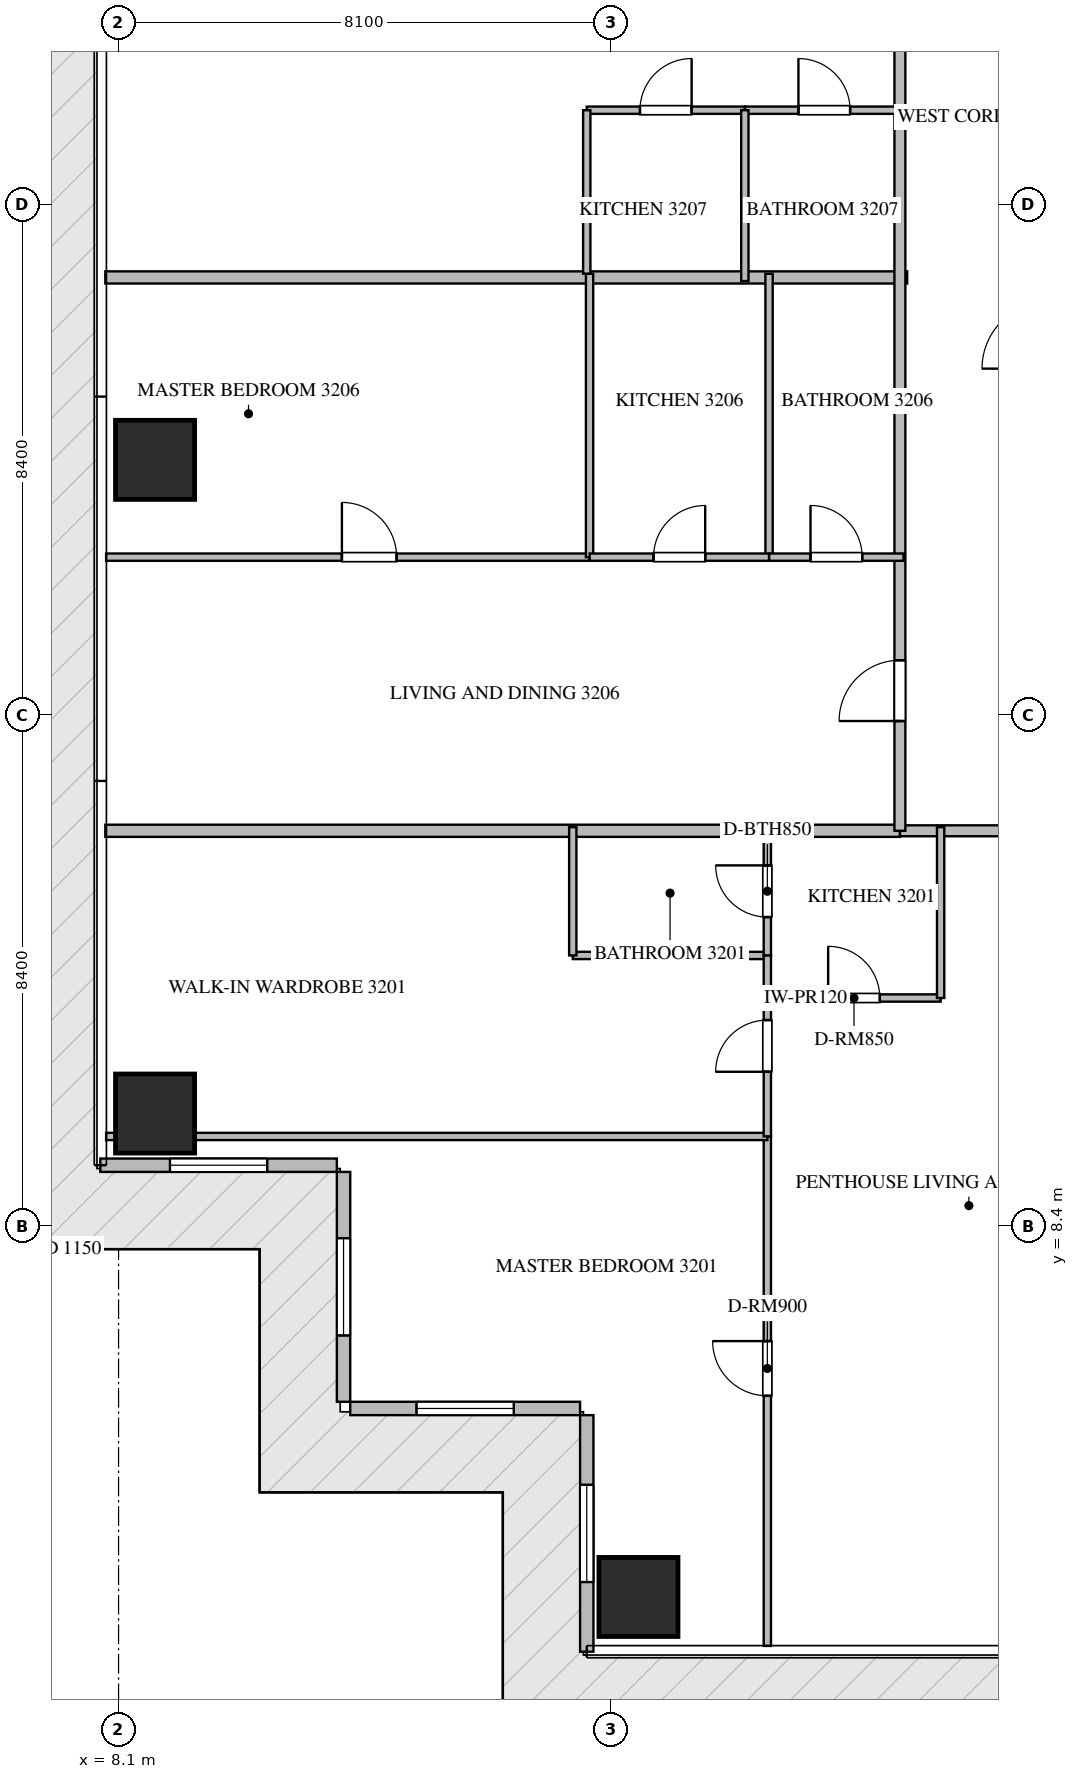
"""IFC4 building model, lengths in metres.
Left out: names, types, materials, properties, quantities, classifications, styles, units other than length and angle.
Written with IfcOpenShell. Run it as: python <this file> out.ifc"""

import sys

from ifc_helpers import new_model, si_unit, direction, frame, frame_2d, origin, origin_2d, place, context, subcontext, project, spatial, rectangle, extrude, source, transform, mapped, element, fill, save


model = new_model("IFC4")
c1 = context("Model", 3, precision=1e-05, world=origin(), true_north=direction((0.0, 1.0)))
c2 = subcontext(c1, "Body", "Model", "MODEL_VIEW")
j1 = project(units=[si_unit("LENGTHUNIT", "METRE"), si_unit("PLANEANGLEUNIT", "RADIAN")], contexts=[c1])
p1 = place(None, origin())
s1 = spatial("IfcSite", under=j1, at=p1, CompositionType="ELEMENT")
p2 = place(p1, origin())
s2 = spatial("IfcBuilding", under=s1, at=p2, CompositionType="ELEMENT")
p3 = place(p2, frame((0.0, 0.0, 131.4)))
s3 = spatial("IfcBuildingStorey", under=s2, at=p3, CompositionType="ELEMENT", Elevation=131.4)
m1 = source(origin(), c2, "Body", "SweptSolid", [
    extrude(rectangle(XDim=1.3, YDim=1.3, at=origin_2d()), origin(), (0.0, 0.0, 1.0), 3.75),
])
for number, where, z_axis, x_axis in (
    (1, (16.65, 2.3, -0.26), (0.0, 0.0, 1.0), (1.0, 0.0, 0.0)),
    (2, (8.7, 10.25, -0.26), (0.0, 0.0, 1.0), (1.0, 0.0, 0.0)),
    (3, (8.7, 21.0, -0.26), (0.0, 0.0, 1.0), (1.0, 0.0, 0.0)),
):
    element("IfcColumn", number, at=place(p3, frame(where, z_axis=z_axis, x_axis=x_axis)), inside=s3, PredefinedType="COLUMN", context=c2, shape_type="MappedRepresentation", body=[
        mapped(m1, transform((0.0, 0.0, 0.0), scale=1.0)),
    ])
p4 = place(p3, frame((7.8, 9.4, 0.0), z_axis=(0.0, 0.0, 1.0), x_axis=(1.0, 0.0, 0.0)))
e4 = element("IfcWall", 4, at=p4, inside=s3, PredefinedType="ELEMENTEDWALL", context=c2, shape_type="SweptSolid", body=[
    extrude(rectangle(XDim=3.89, YDim=0.22, at=frame_2d((1.945, 0.0))), origin(), (0.0, 0.0, 1.0), 3.475),
])
p5 = place(p4, frame((1.145, 0.0, 0.65)))
e5 = element("IfcOpeningElement", 5, at=p5, cuts=e4, PredefinedType="OPENING", context=c2, shape_type="SweptSolid", body=[
    extrude(rectangle(XDim=1.6, YDim=2.1, at=frame_2d((0.8, 1.05))), frame((0.0, 0.12, 0.0), z_axis=(0.0, -1.0, 0.0), x_axis=(1.0, 0.0, 0.0)), (0.0, 0.0, 1.0), 0.24),
])
p6 = place(p3, frame((11.8, 9.29, 0.0), z_axis=(0.0, 0.0, 1.0), x_axis=(0.0, -1.0, 0.0)))
e6 = element("IfcWall", 6, at=p6, inside=s3, PredefinedType="ELEMENTEDWALL", context=c2, shape_type="SweptSolid", body=[
    extrude(rectangle(XDim=3.78, YDim=0.22, at=frame_2d((1.89, 0.0))), origin(), (0.0, 0.0, 1.0), 3.475),
])
p7 = place(p6, frame((1.09, 0.0, 0.65)))
e7 = element("IfcOpeningElement", 7, at=p7, cuts=e6, PredefinedType="OPENING", context=c2, shape_type="SweptSolid", body=[
    extrude(rectangle(XDim=1.6, YDim=2.1, at=frame_2d((0.8, 1.05))), frame((0.0, 0.12, 0.0), z_axis=(0.0, -1.0, 0.0), x_axis=(1.0, 0.0, 0.0)), (0.0, 0.0, 1.0), 0.24),
])
p8 = place(p3, frame((11.91, 5.4, 0.0), z_axis=(0.0, 0.0, 1.0), x_axis=(1.0, 0.0, 0.0)))
e8 = element("IfcWall", 8, at=p8, inside=s3, PredefinedType="ELEMENTEDWALL", context=c2, shape_type="SweptSolid", body=[
    extrude(rectangle(XDim=3.78, YDim=0.22, at=frame_2d((1.89, 0.0))), origin(), (0.0, 0.0, 1.0), 3.475),
])
p9 = place(p8, frame((1.09, 0.0, 0.65)))
e9 = element("IfcOpeningElement", 9, at=p9, cuts=e8, PredefinedType="OPENING", context=c2, shape_type="SweptSolid", body=[
    extrude(rectangle(XDim=1.6, YDim=2.1, at=frame_2d((0.8, 1.05))), frame((0.0, 0.12, 0.0), z_axis=(0.0, -1.0, 0.0), x_axis=(1.0, 0.0, 0.0)), (0.0, 0.0, 1.0), 0.24),
])
p10 = place(p3, frame((15.8, 5.29, 0.0), z_axis=(0.0, 0.0, 1.0), x_axis=(0.0, -1.0, 0.0)))
e10 = element("IfcWall", 10, at=p10, inside=s3, PredefinedType="ELEMENTEDWALL", context=c2, shape_type="SweptSolid", body=[
    extrude(rectangle(XDim=3.89, YDim=0.22, at=frame_2d((1.945, 0.0))), origin(), (0.0, 0.0, 1.0), 3.475),
])
p11 = place(p10, frame((1.145, 0.0, 0.65)))
e11 = element("IfcOpeningElement", 11, at=p11, cuts=e10, PredefinedType="OPENING", context=c2, shape_type="SweptSolid", body=[
    extrude(rectangle(XDim=1.6, YDim=2.1, at=frame_2d((0.8, 1.05))), frame((0.0, 0.12, 0.0), z_axis=(0.0, -1.0, 0.0), x_axis=(1.0, 0.0, 0.0)), (0.0, 0.0, 1.0), 0.24),
])
p12 = place(p3, frame((7.882, 24.0, 0.0), z_axis=(0.0, 0.0, 1.0), x_axis=(1.0, 0.0, 0.0)))
e12 = element("IfcWall", 12, at=p12, inside=s3, PredefinedType="PARTITIONING", context=c2, shape_type="SweptSolid", body=[
    extrude(rectangle(XDim=13.188, YDim=0.2, at=frame_2d((6.594, 0.0))), origin(), (0.0, 0.0, 1.0), 3.49),
])
p13 = place(p3, frame((7.882, 14.9, 0.0), z_axis=(0.0, 0.0, 1.0), x_axis=(1.0, 0.0, 0.0)))
e13 = element("IfcWall", 13, at=p13, inside=s3, PredefinedType="PARTITIONING", context=c2, shape_type="SweptSolid", body=[
    extrude(rectangle(XDim=13.068, YDim=0.2, at=frame_2d((6.534, 0.0))), origin(), (0.0, 0.0, 1.0), 3.49),
])
p14 = place(p3, frame((20.952, 14.9, 0.0), z_axis=(0.0, 0.0, 1.0), x_axis=(1.0, 0.0, 0.0)))
e14 = element("IfcWall", 14, at=p14, inside=s3, PredefinedType="PARTITIONING", context=c2, shape_type="SweptSolid", body=[
    extrude(rectangle(XDim=22.896, YDim=0.18, at=frame_2d((11.448, 0.0))), origin(), (0.0, 0.0, 1.0), 3.49),
])
p15 = place(p14, frame((2.19, 0.0, 0.0)))
e15 = element("IfcOpeningElement", 15, at=p15, cuts=e14, PredefinedType="OPENING", context=c2, shape_type="SweptSolid", body=[
    extrude(rectangle(XDim=1.0, YDim=2.15, at=frame_2d((0.5, 1.075))), frame((0.0, 0.1, 0.0), z_axis=(0.0, -1.0, 0.0), x_axis=(1.0, 0.0, 0.0)), (0.0, 0.0, 1.0), 0.2),
])
p16 = place(p14, frame((14.955, 0.0, 0.0)))
e16 = element("IfcOpeningElement", 16, at=p16, cuts=e14, PredefinedType="OPENING", context=c2, shape_type="SweptSolid", body=[
    extrude(rectangle(XDim=1.0, YDim=2.15, at=frame_2d((0.5, 1.075))), frame((0.0, 0.1, 0.0), z_axis=(0.0, -1.0, 0.0), x_axis=(1.0, 0.0, 0.0)), (0.0, 0.0, 1.0), 0.2),
])
p17 = place(p14, frame((19.509, 0.0, 0.0)))
e17 = element("IfcOpeningElement", 17, at=p17, cuts=e14, PredefinedType="OPENING", context=c2, shape_type="SweptSolid", body=[
    extrude(rectangle(XDim=1.0, YDim=2.15, at=frame_2d((0.5, 1.075))), frame((0.0, 0.1, 0.0), z_axis=(0.0, -1.0, 0.0), x_axis=(1.0, 0.0, 0.0)), (0.0, 0.0, 1.0), 0.2),
])
p18 = place(p3, frame((20.95, 14.9, 0.0), z_axis=(0.0, 0.0, 1.0), x_axis=(0.0, 1.0, 0.0)))
e18 = element("IfcWall", 18, at=p18, inside=s3, PredefinedType="PARTITIONING", context=c2, shape_type="SweptSolid", body=[
    extrude(rectangle(XDim=18.7, YDim=0.18, at=frame_2d((9.35, 0.0))), origin(), (0.0, 0.0, 1.0), 3.49),
])
p19 = place(p18, frame((1.805, 0.0, 0.0)))
e19 = element("IfcOpeningElement", 19, at=p19, cuts=e18, PredefinedType="OPENING", context=c2, shape_type="SweptSolid", body=[
    extrude(rectangle(XDim=1.0, YDim=2.15, at=frame_2d((0.5, 1.075))), frame((0.0, 0.1, 0.0), z_axis=(0.0, -1.0, 0.0), x_axis=(1.0, 0.0, 0.0)), (0.0, 0.0, 1.0), 0.2),
])
p20 = place(p18, frame((14.726, 0.0, 0.0)))
e20 = element("IfcOpeningElement", 20, at=p20, cuts=e18, PredefinedType="OPENING", context=c2, shape_type="SweptSolid", body=[
    extrude(rectangle(XDim=1.0, YDim=2.15, at=frame_2d((0.5, 1.075))), frame((0.0, 0.1, 0.0), z_axis=(0.0, -1.0, 0.0), x_axis=(1.0, 0.0, 0.0)), (0.0, 0.0, 1.0), 0.2),
])
p21 = place(p3, frame((18.77, 12.15, 0.0), z_axis=(0.0, 0.0, 1.0), x_axis=(1.0, 0.0, 0.0)))
e21 = element("IfcWall", 21, at=p21, inside=s3, PredefinedType="PARTITIONING", context=c2, shape_type="SweptSolid", body=[
    extrude(rectangle(XDim=2.85, YDim=0.12, at=frame_2d((1.425, 0.0))), origin(), (0.0, 0.0, 1.0), 3.49),
])
p22 = place(p21, frame((1.0, 0.0, 0.0)))
e22 = element("IfcOpeningElement", 22, at=p22, cuts=e21, PredefinedType="OPENING", context=c2, shape_type="SweptSolid", body=[
    extrude(rectangle(XDim=0.85, YDim=2.1, at=frame_2d((0.425, 1.05))), frame((0.0, 0.07, 0.0), z_axis=(0.0, -1.0, 0.0), x_axis=(1.0, 0.0, 0.0)), (0.0, 0.0, 1.0), 0.14),
])
p23 = place(p3, frame((21.62, 12.15, 0.0), z_axis=(0.0, 0.0, 1.0), x_axis=(0.0, 1.0, 0.0)))
e23 = element("IfcWall", 23, at=p23, inside=s3, PredefinedType="PARTITIONING", context=c2, shape_type="SweptSolid", body=[
    extrude(rectangle(XDim=2.81, YDim=0.12, at=frame_2d((1.405, 0.0))), origin(), (0.0, 0.0, 1.0), 3.49),
])
p24 = place(p3, frame((18.77, 1.495, 0.0), z_axis=(0.0, 0.0, 1.0), x_axis=(0.0, 1.0, 0.0)))
e24 = element("IfcWall", 24, at=p24, inside=s3, PredefinedType="PARTITIONING", context=c2, shape_type="SweptSolid", body=[
    extrude(rectangle(XDim=8.378, YDim=0.12, at=frame_2d((4.189, 0.0))), origin(), (0.0, 0.0, 1.0), 3.49),
])
p25 = place(p24, frame((4.113, 0.0, 0.0)))
e25 = element("IfcOpeningElement", 25, at=p25, cuts=e24, PredefinedType="OPENING", context=c2, shape_type="SweptSolid", body=[
    extrude(rectangle(XDim=0.9, YDim=2.1, at=frame_2d((0.45, 1.05))), frame((0.0, 0.07, 0.0), z_axis=(0.0, -1.0, 0.0), x_axis=(1.0, 0.0, 0.0)), (0.0, 0.0, 1.0), 0.14),
])
p26 = place(p3, frame((7.895, 9.873, 0.0), z_axis=(0.0, 0.0, 1.0), x_axis=(1.0, 0.0, 0.0)))
e26 = element("IfcWall", 26, at=p26, inside=s3, PredefinedType="PARTITIONING", context=c2, shape_type="SweptSolid", body=[
    extrude(rectangle(XDim=10.875, YDim=0.12, at=frame_2d((5.438, 0.0))), origin(), (0.0, 0.0, 1.0), 3.49),
])
p27 = place(p3, frame((15.57, 12.85, 0.0), z_axis=(0.0, 0.0, 1.0), x_axis=(1.0, 0.0, 0.0)))
e27 = element("IfcWall", 27, at=p27, inside=s3, PredefinedType="PARTITIONING", context=c2, shape_type="SweptSolid", body=[
    extrude(rectangle(XDim=3.2, YDim=0.12, at=frame_2d((1.6, 0.0))), origin(), (0.0, 0.0, 1.0), 3.49),
])
p28 = place(p3, frame((15.57, 12.85, 0.0), z_axis=(0.0, 0.0, 1.0), x_axis=(0.0, 1.0, 0.0)))
e28 = element("IfcWall", 28, at=p28, inside=s3, PredefinedType="PARTITIONING", context=c2, shape_type="SweptSolid", body=[
    extrude(rectangle(XDim=2.11, YDim=0.12, at=frame_2d((1.055, 0.0))), origin(), (0.0, 0.0, 1.0), 3.49),
])
p29 = place(p3, frame((18.77, 9.875, 0.0), z_axis=(0.0, 0.0, 1.0), x_axis=(0.0, 1.0, 0.0)))
e29 = element("IfcWall", 29, at=p29, inside=s3, PredefinedType="PARTITIONING", context=c2, shape_type="SweptSolid", body=[
    extrude(rectangle(XDim=2.975, YDim=0.12, at=frame_2d((1.488, 0.0))), origin(), (0.0, 0.0, 1.0), 3.49),
])
p30 = place(p29, frame((1.062, 0.0, 0.0)))
e30 = element("IfcOpeningElement", 30, at=p30, cuts=e29, PredefinedType="OPENING", context=c2, shape_type="SweptSolid", body=[
    extrude(rectangle(XDim=0.85, YDim=2.1, at=frame_2d((0.425, 1.05))), frame((0.0, 0.07, 0.0), z_axis=(0.0, -1.0, 0.0), x_axis=(1.0, 0.0, 0.0)), (0.0, 0.0, 1.0), 0.14),
])
p31 = place(p3, frame((18.77, 12.852, 0.0), z_axis=(0.0, 0.0, 1.0), x_axis=(0.0, 1.0, 0.0)))
e31 = element("IfcWall", 31, at=p31, inside=s3, PredefinedType="PARTITIONING", context=c2, shape_type="SweptSolid", body=[
    extrude(rectangle(XDim=2.108, YDim=0.12, at=frame_2d((1.054, 0.0))), origin(), (0.0, 0.0, 1.0), 3.49),
])
p32 = place(p31, frame((0.629, 0.0, 0.0)))
e32 = element("IfcOpeningElement", 32, at=p32, cuts=e31, PredefinedType="OPENING", context=c2, shape_type="SweptSolid", body=[
    extrude(rectangle(XDim=0.85, YDim=2.1, at=frame_2d((0.425, 1.05))), frame((0.0, 0.07, 0.0), z_axis=(0.0, -1.0, 0.0), x_axis=(1.0, 0.0, 0.0)), (0.0, 0.0, 1.0), 0.14),
])
p33 = place(p3, frame((7.895, 19.4, 0.0), z_axis=(0.0, 0.0, 1.0), x_axis=(1.0, 0.0, 0.0)))
e33 = element("IfcWall", 33, at=p33, inside=s3, PredefinedType="PARTITIONING", context=c2, shape_type="SweptSolid", body=[
    extrude(rectangle(XDim=7.951, YDim=0.12, at=frame_2d((3.976, 0.0))), origin(), (0.0, 0.0, 1.0), 3.49),
])
p34 = place(p33, frame((3.878, 0.0, 0.0)))
e34 = element("IfcOpeningElement", 34, at=p34, cuts=e33, PredefinedType="OPENING", context=c2, shape_type="SweptSolid", body=[
    extrude(rectangle(XDim=0.9, YDim=2.1, at=frame_2d((0.45, 1.05))), frame((0.0, 0.07, 0.0), z_axis=(0.0, -1.0, 0.0), x_axis=(1.0, 0.0, 0.0)), (0.0, 0.0, 1.0), 0.14),
])
for number, where, z_axis, x_axis in (
    (35, (15.846, 19.4, 0.0), (0.0, 0.0, 1.0), (0.0, 1.0, 0.0)),
    (36, (18.798, 19.4, 0.0), (0.0, 0.0, 1.0), (0.0, 1.0, 0.0)),
):
    element("IfcWall", number, at=place(p3, frame(where, z_axis=z_axis, x_axis=x_axis)), inside=s3, PredefinedType="PARTITIONING", context=c2, shape_type="SweptSolid", body=[
        extrude(rectangle(XDim=4.66, YDim=0.12, at=frame_2d((2.33, 0.0))), origin(), (0.0, 0.0, 1.0), 3.49),
    ])
p35 = place(p3, frame((15.848, 19.4, 0.0), z_axis=(0.0, 0.0, 1.0), x_axis=(1.0, 0.0, 0.0)))
e37 = element("IfcWall", 37, at=p35, inside=s3, PredefinedType="PARTITIONING", context=c2, shape_type="SweptSolid", body=[
    extrude(rectangle(XDim=2.95, YDim=0.12, at=frame_2d((1.475, 0.0))), origin(), (0.0, 0.0, 1.0), 3.49),
])
p36 = place(p35, frame((1.05, 0.0, 0.0)))
e38 = element("IfcOpeningElement", 38, at=p36, cuts=e37, PredefinedType="OPENING", context=c2, shape_type="SweptSolid", body=[
    extrude(rectangle(XDim=0.85, YDim=2.1, at=frame_2d((0.425, 1.05))), frame((0.0, 0.07, 0.0), z_axis=(0.0, -1.0, 0.0), x_axis=(1.0, 0.0, 0.0)), (0.0, 0.0, 1.0), 0.14),
])
p37 = place(p3, frame((18.8, 19.4, 0.0), z_axis=(0.0, 0.0, 1.0), x_axis=(1.0, 0.0, 0.0)))
e39 = element("IfcWall", 39, at=p37, inside=s3, PredefinedType="PARTITIONING", context=c2, shape_type="SweptSolid", body=[
    extrude(rectangle(XDim=2.21, YDim=0.12, at=frame_2d((1.105, 0.0))), origin(), (0.0, 0.0, 1.0), 3.49),
])
p38 = place(p37, frame((0.68, 0.0, 0.0)))
e40 = element("IfcOpeningElement", 40, at=p38, cuts=e39, PredefinedType="OPENING", context=c2, shape_type="SweptSolid", body=[
    extrude(rectangle(XDim=0.85, YDim=2.1, at=frame_2d((0.425, 1.05))), frame((0.0, 0.07, 0.0), z_axis=(0.0, -1.0, 0.0), x_axis=(1.0, 0.0, 0.0)), (0.0, 0.0, 1.0), 0.14),
])
p39 = place(p3, frame((15.8, 26.75, 0.0), z_axis=(0.0, 0.0, 1.0), x_axis=(1.0, 0.0, 0.0)))
e41 = element("IfcWall", 41, at=p39, inside=s3, PredefinedType="PARTITIONING", context=c2, shape_type="SweptSolid", body=[
    extrude(rectangle(XDim=2.6, YDim=0.12, at=frame_2d((1.3, 0.0))), origin(), (0.0, 0.0, 1.0), 3.49),
])
p40 = place(p39, frame((0.875, 0.0, 0.0)))
e42 = element("IfcOpeningElement", 42, at=p40, cuts=e41, PredefinedType="OPENING", context=c2, shape_type="SweptSolid", body=[
    extrude(rectangle(XDim=0.85, YDim=2.1, at=frame_2d((0.425, 1.05))), frame((0.0, 0.07, 0.0), z_axis=(0.0, -1.0, 0.0), x_axis=(1.0, 0.0, 0.0)), (0.0, 0.0, 1.0), 0.14),
])
p41 = place(p3, frame((18.402, 26.75, 0.0), z_axis=(0.0, 0.0, 1.0), x_axis=(1.0, 0.0, 0.0)))
e43 = element("IfcWall", 43, at=p41, inside=s3, PredefinedType="PARTITIONING", context=c2, shape_type="SweptSolid", body=[
    extrude(rectangle(XDim=2.608, YDim=0.12, at=frame_2d((1.304, 0.0))), origin(), (0.0, 0.0, 1.0), 3.49),
])
p42 = place(p41, frame((0.879, 0.0, 0.0)))
e44 = element("IfcOpeningElement", 44, at=p42, cuts=e43, PredefinedType="OPENING", context=c2, shape_type="SweptSolid", body=[
    extrude(rectangle(XDim=0.85, YDim=2.1, at=frame_2d((0.425, 1.05))), frame((0.0, 0.07, 0.0), z_axis=(0.0, -1.0, 0.0), x_axis=(1.0, 0.0, 0.0)), (0.0, 0.0, 1.0), 0.14),
])
p43 = place(p3, frame((18.4, 23.94, 0.0), z_axis=(0.0, 0.0, 1.0), x_axis=(0.0, 1.0, 0.0)))
e45 = element("IfcWall", 45, at=p43, inside=s3, PredefinedType="PARTITIONING", context=c2, shape_type="SweptSolid", body=[
    extrude(rectangle(XDim=2.81, YDim=0.12, at=frame_2d((1.405, 0.0))), origin(), (0.0, 0.0, 1.0), 3.49),
])
p44 = place(p3, frame((15.8, 24.062, 0.0), z_axis=(0.0, 0.0, 1.0), x_axis=(0.0, 1.0, 0.0)))
e46 = element("IfcWall", 46, at=p44, inside=s3, PredefinedType="PARTITIONING", context=c2, shape_type="SweptSolid", body=[
    extrude(rectangle(XDim=2.688, YDim=0.12, at=frame_2d((1.344, 0.0))), origin(), (0.0, 0.0, 1.0), 3.49),
])
m2 = source(origin(), c2, "Body", "SweptSolid", [
    extrude(rectangle(XDim=1.6, YDim=2.1, at=frame_2d((0.8, 1.05))), frame((0.0, 0.03, 0.0), z_axis=(0.0, -1.0, 0.0), x_axis=(1.0, 0.0, 0.0)), (0.0, 0.0, 1.0), 0.06),
])
p45 = place(p5, origin())
e47 = element("IfcWindow", 47, at=p45, inside=s3, PartitioningType="SINGLE_PANEL", PredefinedType="WINDOW", context=c2, shape_type="MappedRepresentation", body=[
    mapped(m2, transform((0.0, 0.0, 0.0), scale=1.0)),
])
fill(e5, e47)
p46 = place(p7, origin())
e48 = element("IfcWindow", 48, at=p46, inside=s3, PartitioningType="SINGLE_PANEL", PredefinedType="WINDOW", context=c2, shape_type="MappedRepresentation", body=[
    mapped(m2, transform((0.0, 0.0, 0.0), scale=1.0)),
])
fill(e7, e48)
p47 = place(p9, origin())
e49 = element("IfcWindow", 49, at=p47, inside=s3, PartitioningType="SINGLE_PANEL", PredefinedType="WINDOW", context=c2, shape_type="MappedRepresentation", body=[
    mapped(m2, transform((0.0, 0.0, 0.0), scale=1.0)),
])
fill(e9, e49)
p48 = place(p11, origin())
e50 = element("IfcWindow", 50, at=p48, inside=s3, PartitioningType="SINGLE_PANEL", PredefinedType="WINDOW", context=c2, shape_type="MappedRepresentation", body=[
    mapped(m2, transform((0.0, 0.0, 0.0), scale=1.0)),
])
fill(e11, e50)
m3 = source(origin(), c2, "Body", "SweptSolid", [
    extrude(rectangle(XDim=1.0, YDim=2.15, at=frame_2d((0.5, 1.075))), frame((0.0, 0.025, 0.0), z_axis=(0.0, -1.0, 0.0), x_axis=(1.0, 0.0, 0.0)), (0.0, 0.0, 1.0), 0.05),
])
p49 = place(p19, origin())
e51 = element("IfcDoor", 51, at=p49, inside=s3, OperationType="SINGLE_SWING_LEFT", PredefinedType="DOOR", context=c2, shape_type="MappedRepresentation", body=[
    mapped(m3, transform((0.0, 0.0, 0.0), scale=1.0)),
])
fill(e19, e51)
m4 = source(origin(), c2, "Body", "SweptSolid", [
    extrude(rectangle(XDim=0.85, YDim=2.1, at=frame_2d((0.425, 1.05))), frame((0.0, 0.025, 0.0), z_axis=(0.0, -1.0, 0.0), x_axis=(1.0, 0.0, 0.0)), (0.0, 0.0, 1.0), 0.05),
])
p50 = place(p22, origin())
e52 = element("IfcDoor", 52, at=p50, inside=s3, OperationType="SINGLE_SWING_LEFT", PredefinedType="DOOR", context=c2, shape_type="MappedRepresentation", body=[
    mapped(m4, transform((0.0, 0.0, 0.0), scale=1.0)),
])
fill(e22, e52)
m5 = source(origin(), c2, "Body", "SweptSolid", [
    extrude(rectangle(XDim=0.9, YDim=2.1, at=frame_2d((0.45, 1.05))), frame((0.0, 0.025, 0.0), z_axis=(0.0, -1.0, 0.0), x_axis=(1.0, 0.0, 0.0)), (0.0, 0.0, 1.0), 0.05),
])
p51 = place(p25, origin())
e53 = element("IfcDoor", 53, at=p51, inside=s3, OperationType="SINGLE_SWING_RIGHT", PredefinedType="DOOR", context=c2, shape_type="MappedRepresentation", body=[
    mapped(m5, transform((0.0, 0.0, 0.0), scale=1.0)),
])
fill(e25, e53)
p52 = place(p30, origin())
e54 = element("IfcDoor", 54, at=p52, inside=s3, OperationType="SINGLE_SWING_LEFT", PredefinedType="DOOR", context=c2, shape_type="MappedRepresentation", body=[
    mapped(m4, transform((0.0, 0.0, 0.0), scale=1.0)),
])
fill(e30, e54)
p53 = place(p32, origin())
e55 = element("IfcDoor", 55, at=p53, inside=s3, OperationType="SINGLE_SWING_RIGHT", PredefinedType="DOOR", context=c2, shape_type="MappedRepresentation", body=[
    mapped(m4, transform((0.0, 0.0, 0.0), scale=1.0)),
])
fill(e32, e55)
p54 = place(p34, origin())
e56 = element("IfcDoor", 56, at=p54, inside=s3, OperationType="SINGLE_SWING_LEFT", PredefinedType="DOOR", context=c2, shape_type="MappedRepresentation", body=[
    mapped(m5, transform((0.0, 0.0, 0.0), scale=1.0)),
])
fill(e34, e56)
p55 = place(p36, origin())
e57 = element("IfcDoor", 57, at=p55, inside=s3, OperationType="SINGLE_SWING_RIGHT", PredefinedType="DOOR", context=c2, shape_type="MappedRepresentation", body=[
    mapped(m4, transform((0.0, 0.0, 0.0), scale=1.0)),
])
fill(e38, e57)
p56 = place(p38, origin())
e58 = element("IfcDoor", 58, at=p56, inside=s3, OperationType="SINGLE_SWING_LEFT", PredefinedType="DOOR", context=c2, shape_type="MappedRepresentation", body=[
    mapped(m4, transform((0.0, 0.0, 0.0), scale=1.0)),
])
fill(e40, e58)
p57 = place(p40, origin())
e59 = element("IfcDoor", 59, at=p57, inside=s3, OperationType="SINGLE_SWING_RIGHT", PredefinedType="DOOR", context=c2, shape_type="MappedRepresentation", body=[
    mapped(m4, transform((0.0, 0.0, 0.0), scale=1.0)),
])
fill(e42, e59)
p58 = place(p42, origin())
e60 = element("IfcDoor", 60, at=p58, inside=s3, OperationType="SINGLE_SWING_LEFT", PredefinedType="DOOR", context=c2, shape_type="MappedRepresentation", body=[
    mapped(m4, transform((0.0, 0.0, 0.0), scale=1.0)),
])
fill(e44, e60)
save(model, sys.argv[1])
